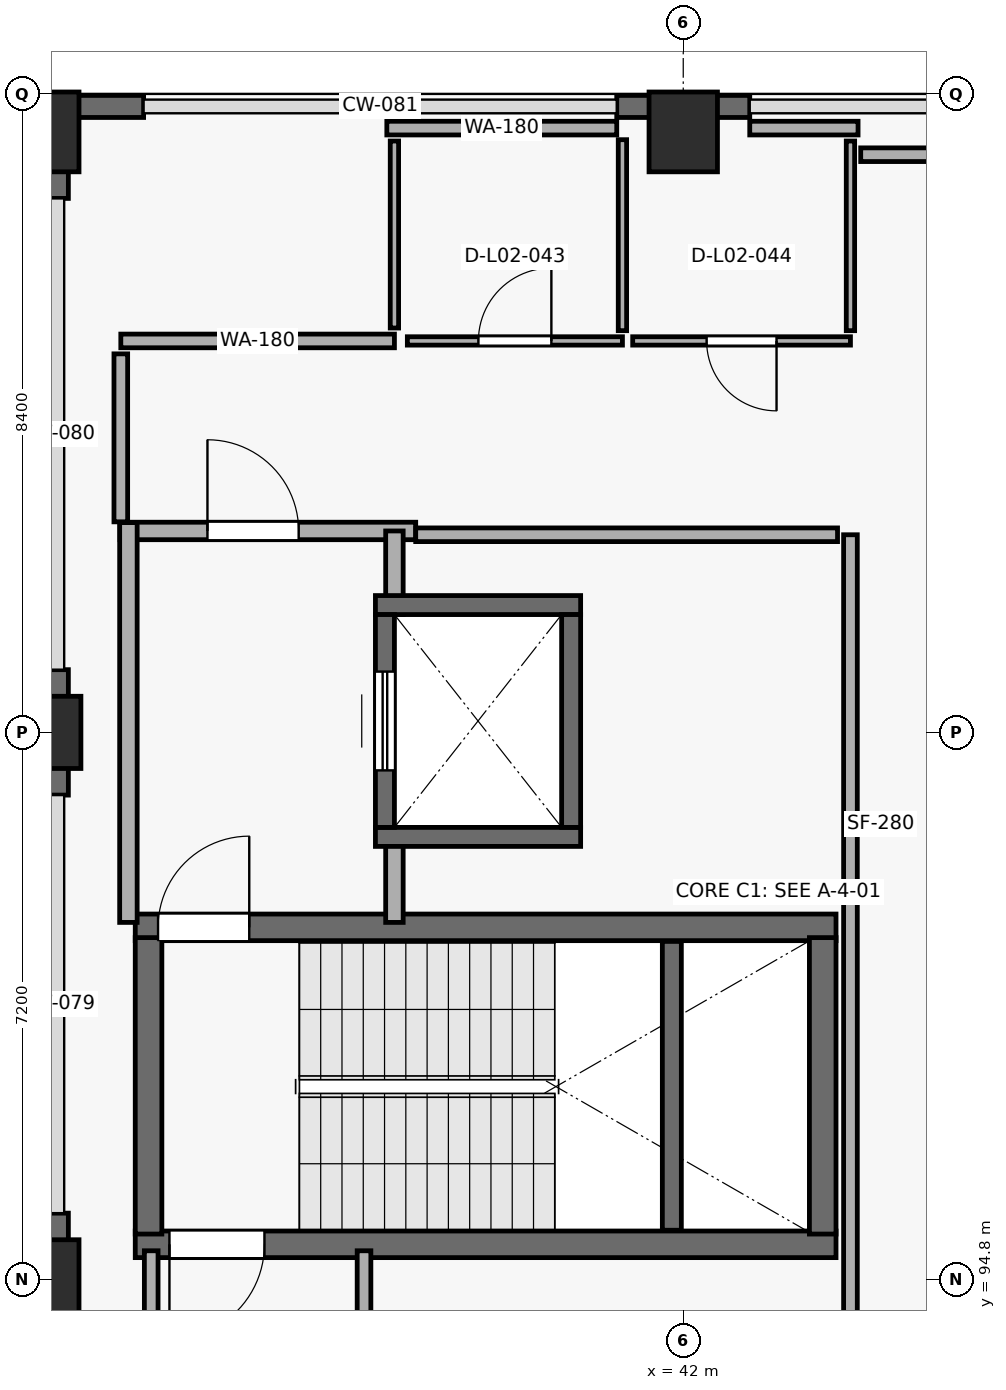
"""IFC4 building model, lengths in metres.
Left out: names, types, materials, properties, quantities, classifications, styles, units other than length and angle.
Written with IfcOpenShell. Run it as: python <this file> out.ifc"""

import sys

from ifc_helpers import new_model, si_unit, direction, frame, frame_2d, origin, origin_2d, place, context, subcontext, project, spatial, rectangle, extrude, element, fill, save


model = new_model("IFC4")
c1 = context("Model", 3, precision=1e-05, world=origin(), true_north=direction((0.0, 1.0)))
c2 = subcontext(c1, "Body", "Model", "MODEL_VIEW")
j1 = project(units=[si_unit("LENGTHUNIT", "METRE"), si_unit("PLANEANGLEUNIT", "RADIAN")], contexts=[c1])
p1 = place(None, origin())
s1 = spatial("IfcSite", under=j1, at=p1, CompositionType="ELEMENT")
p2 = place(p1, origin())
s2 = spatial("IfcBuilding", under=s1, at=p2, CompositionType="ELEMENT")
p3 = place(p2, frame((0.0, 0.0, 5.4)))
s3 = spatial("IfcBuildingStorey", under=s2, at=p3, CompositionType="ELEMENT", Elevation=5.4)
p4 = place(p3, frame((33.6, 94.8, 0.0), z_axis=(0.0, 0.0, 1.0), x_axis=(1.0, 0.0, 0.0)))
e1 = element("IfcColumn", 1, at=p4, inside=s3, PredefinedType="COLUMN", context=c2, shape_type="SweptSolid", body=[
    extrude(rectangle(XDim=0.9, YDim=1.05, at=origin_2d()), origin(), (0.0, 0.0, 1.0), 4.8),
])
p5 = place(p3, frame((33.6, 102.0, 0.0), z_axis=(0.0, 0.0, 1.0), x_axis=(1.0, 0.0, 0.0)))
e2 = element("IfcColumn", 2, at=p5, inside=s3, PredefinedType="COLUMN", context=c2, shape_type="SweptSolid", body=[
    extrude(rectangle(XDim=0.95, YDim=0.95, at=origin_2d()), origin(), (0.0, 0.0, 1.0), 4.8),
])
for number, where, z_axis, x_axis in (
    (3, (33.6, 109.9, 0.0), (0.0, 0.0, 1.0), (1.0, 0.0, 0.0)),
    (4, (42.0, 109.9, 0.0), (0.0, 0.0, 1.0), (1.0, 0.0, 0.0)),
):
    element("IfcColumn", number, at=place(p3, frame(where, z_axis=z_axis, x_axis=x_axis)), inside=s3, PredefinedType="COLUMN", context=c2, shape_type="SweptSolid", body=[
        extrude(rectangle(XDim=0.9, YDim=1.05, at=origin_2d()), origin(), (0.0, 0.0, 1.0), 4.8),
    ])
p6 = place(p3, frame((33.765, 91.2, 0.0), z_axis=(0.0, 0.0, 1.0), x_axis=(0.0, 1.0, 0.0)))
e5 = element("IfcWall", 5, at=p6, inside=s3, PredefinedType="SOLIDWALL", context=c2, shape_type="SweptSolid", body=[
    extrude(rectangle(XDim=4.475, YDim=0.29, at=frame_2d((2.238, 0.0))), origin(), (0.0, 0.0, 1.0), 4.52),
])
p7 = place(p3, frame((33.765, 101.175, 0.0), z_axis=(0.0, 0.0, 1.0), x_axis=(0.0, 1.0, 0.0)))
e6 = element("IfcWall", 6, at=p7, inside=s3, PredefinedType="SOLIDWALL", context=c2, shape_type="SweptSolid", body=[
    extrude(rectangle(XDim=1.65, YDim=0.29, at=frame_2d((0.825, 0.0))), origin(), (0.0, 0.0, 1.0), 4.52),
])
p8 = place(p3, frame((33.765, 109.025, 0.0), z_axis=(0.0, 0.0, 1.0), x_axis=(0.0, 1.0, 0.0)))
e7 = element("IfcWall", 7, at=p8, inside=s3, PredefinedType="SOLIDWALL", context=c2, shape_type="SweptSolid", body=[
    extrude(rectangle(XDim=1.375, YDim=0.29, at=frame_2d((0.688, 0.0))), origin(), (0.0, 0.0, 1.0), 4.52),
])
p9 = place(p3, frame((33.6, 110.235, 0.0), z_axis=(0.0, 0.0, 1.0), x_axis=(1.0, 0.0, 0.0)))
e8 = element("IfcWall", 8, at=p9, inside=s3, PredefinedType="SOLIDWALL", context=c2, shape_type="SweptSolid", body=[
    extrude(rectangle(XDim=1.3, YDim=0.29, at=frame_2d((0.65, 0.0))), origin(), (0.0, 0.0, 1.0), 4.52),
])
p10 = place(p3, frame((41.125, 110.235, 0.0), z_axis=(0.0, 0.0, 1.0), x_axis=(1.0, 0.0, 0.0)))
e9 = element("IfcWall", 9, at=p10, inside=s3, PredefinedType="SOLIDWALL", context=c2, shape_type="SweptSolid", body=[
    extrude(rectangle(XDim=1.75, YDim=0.29, at=frame_2d((0.875, 0.0))), origin(), (0.0, 0.0, 1.0), 4.52),
])
p11 = place(p3, frame((34.79, 95.265, 0.0), z_axis=(0.0, 0.0, 1.0), x_axis=(1.0, 0.0, 0.0)))
e10 = element("IfcWall", 10, at=p11, inside=s3, PredefinedType="SHEAR", context=c2, shape_type="SweptSolid", body=[
    extrude(rectangle(XDim=9.22, YDim=0.35, at=frame_2d((4.61, 0.0))), origin(), (0.0, 0.0, 1.0), 4.52),
])
p12 = place(p11, frame((0.45, 0.0, 0.0)))
e11 = element("IfcOpeningElement", 11, at=p12, cuts=e10, PredefinedType="OPENING", context=c2, shape_type="SweptSolid", body=[
    extrude(rectangle(XDim=1.25, YDim=2.2, at=frame_2d((0.625, 1.1))), frame((0.0, 0.185, 0.0), z_axis=(0.0, -1.0, 0.0), x_axis=(1.0, 0.0, 0.0)), (0.0, 0.0, 1.0), 0.37),
])
p13 = place(p3, frame((44.01, 99.435, 0.0), z_axis=(0.0, 0.0, 1.0), x_axis=(-1.0, 0.0, 0.0)))
e12 = element("IfcWall", 12, at=p13, inside=s3, PredefinedType="SHEAR", context=c2, shape_type="SweptSolid", body=[
    extrude(rectangle(XDim=9.22, YDim=0.35, at=frame_2d((4.61, 0.0))), origin(), (0.0, 0.0, 1.0), 4.52),
])
p14 = place(p13, frame((7.72, 0.0, 0.0)))
e13 = element("IfcOpeningElement", 13, at=p14, cuts=e12, PredefinedType="OPENING", context=c2, shape_type="SweptSolid", body=[
    extrude(rectangle(XDim=1.2, YDim=2.2, at=frame_2d((0.6, 1.1))), frame((0.0, 0.185, 0.0), z_axis=(0.0, -1.0, 0.0), x_axis=(1.0, 0.0, 0.0)), (0.0, 0.0, 1.0), 0.37),
])
for number, where, z_axis, x_axis in (
    (14, (34.965, 95.4, 0.0), (0.0, 0.0, 1.0), (0.0, 1.0, 0.0)),
    (15, (43.835, 99.3, 0.0), (0.0, 0.0, 1.0), (0.0, -1.0, 0.0)),
):
    element("IfcWall", number, at=place(p3, frame(where, z_axis=z_axis, x_axis=x_axis)), inside=s3, PredefinedType="SHEAR", context=c2, shape_type="SweptSolid", body=[
        extrude(rectangle(XDim=3.9, YDim=0.35, at=frame_2d((1.95, 0.0))), origin(), (0.0, 0.0, 1.0), 4.52),
    ])
p15 = place(p3, frame((41.85, 95.45, 0.0), z_axis=(0.0, 0.0, 1.0), x_axis=(0.0, 1.0, 0.0)))
e16 = element("IfcWall", 16, at=p15, inside=s3, PredefinedType="SHEAR", context=c2, shape_type="SweptSolid", body=[
    extrude(rectangle(XDim=3.8, YDim=0.25, at=frame_2d((1.9, 0.0))), origin(), (0.0, 0.0, 1.0), 2.22),
])
p16 = place(p3, frame((34.59, 104.65, 0.0), z_axis=(0.0, 0.0, 1.0), x_axis=(1.0, 0.0, 0.0)))
e17 = element("IfcWall", 17, at=p16, inside=s3, PredefinedType="PARTITIONING", context=c2, shape_type="SweptSolid", body=[
    extrude(rectangle(XDim=3.89, YDim=0.23, at=frame_2d((1.945, 0.0))), origin(), (0.0, 0.0, 1.0), 4.52),
])
p17 = place(p16, frame((1.15, 0.0, 0.0)))
e18 = element("IfcOpeningElement", 18, at=p17, cuts=e17, PredefinedType="OPENING", context=c2, shape_type="SweptSolid", body=[
    extrude(rectangle(XDim=1.2, YDim=2.2, at=frame_2d((0.6, 1.1))), frame((0.0, 0.125, 0.0), z_axis=(0.0, -1.0, 0.0), x_axis=(1.0, 0.0, 0.0)), (0.0, 0.0, 1.0), 0.25),
])
p18 = place(p3, frame((34.7, 99.5, 0.0), z_axis=(0.0, 0.0, 1.0), x_axis=(0.0, 1.0, 0.0)))
e19 = element("IfcWall", 19, at=p18, inside=s3, PredefinedType="PARTITIONING", context=c2, shape_type="SweptSolid", body=[
    extrude(rectangle(XDim=5.26, YDim=0.23, at=frame_2d((2.63, 0.0))), origin(), (0.0, 0.0, 1.0), 4.52),
])
p19 = place(p3, frame((38.2, 104.65, 0.0), z_axis=(0.0, 0.0, 1.0), x_axis=(0.0, -1.0, 0.0)))
e20 = element("IfcWall", 20, at=p19, inside=s3, PredefinedType="PARTITIONING", context=c2, shape_type="SweptSolid", body=[
    extrude(rectangle(XDim=1.1, YDim=0.23, at=frame_2d((0.55, 0.0))), origin(), (0.0, 0.0, 1.0), 4.52),
])
p20 = place(p3, frame((38.2, 100.75, 0.0), z_axis=(0.0, 0.0, 1.0), x_axis=(0.0, -1.0, 0.0)))
e21 = element("IfcWall", 21, at=p20, inside=s3, PredefinedType="PARTITIONING", context=c2, shape_type="SweptSolid", body=[
    extrude(rectangle(XDim=1.25, YDim=0.23, at=frame_2d((0.625, 0.0))), origin(), (0.0, 0.0, 1.0), 4.52),
])
for number, where, z_axis, x_axis in (
    (22, (37.95, 100.625, 0.0), (0.0, 0.0, 1.0), (1.0, 0.0, 0.0)),
    (23, (40.65, 103.675, 0.0), (0.0, 0.0, 1.0), (-1.0, 0.0, 0.0)),
):
    element("IfcWall", number, at=place(p3, frame(where, z_axis=z_axis, x_axis=x_axis)), inside=s3, PredefinedType="SHEAR", context=c2, shape_type="SweptSolid", body=[
        extrude(rectangle(XDim=2.7, YDim=0.25, at=frame_2d((1.35, 0.0))), origin(), (0.0, 0.0, 1.0), 4.52),
    ])
p21 = place(p3, frame((38.075, 100.75, 0.0), z_axis=(0.0, 0.0, 1.0), x_axis=(0.0, 1.0, 0.0)))
e24 = element("IfcWall", 24, at=p21, inside=s3, PredefinedType="SHEAR", context=c2, shape_type="SweptSolid", body=[
    extrude(rectangle(XDim=2.8, YDim=0.25, at=frame_2d((1.4, 0.0))), origin(), (0.0, 0.0, 1.0), 4.52),
])
p22 = place(p21, frame((0.75, 0.0, 0.0)))
e25 = element("IfcOpeningElement", 25, at=p22, cuts=e24, PredefinedType="OPENING", context=c2, shape_type="SweptSolid", body=[
    extrude(rectangle(XDim=1.3, YDim=2.25, at=frame_2d((0.65, 1.125))), frame((0.0, 0.135, 0.0), z_axis=(0.0, -1.0, 0.0), x_axis=(1.0, 0.0, 0.0)), (0.0, 0.0, 1.0), 0.27),
])
p23 = place(p3, frame((40.525, 103.55, 0.0), z_axis=(0.0, 0.0, 1.0), x_axis=(0.0, -1.0, 0.0)))
e26 = element("IfcWall", 26, at=p23, inside=s3, PredefinedType="SHEAR", context=c2, shape_type="SweptSolid", body=[
    extrude(rectangle(XDim=2.8, YDim=0.25, at=frame_2d((1.4, 0.0))), origin(), (0.0, 0.0, 1.0), 4.52),
])
p24 = place(p3, frame((44.2, 104.6, 0.0), z_axis=(0.0, 0.0, 1.0), x_axis=(0.0, -1.0, 0.0)))
e27 = element("IfcWall", 27, at=p24, inside=s3, PredefinedType="PARTITIONING", context=c2, shape_type="SweptSolid", body=[
    extrude(rectangle(XDim=10.75, YDim=0.18, at=frame_2d((5.375, 0.0))), origin(), (0.0, 0.0, 1.0), 4.52),
])
p25 = place(p3, frame((44.3, 109.95, 0.0), z_axis=(0.0, 0.0, 1.0), x_axis=(-1.0, 0.0, 0.0)))
e28 = element("IfcWall", 28, at=p25, inside=s3, PredefinedType="PARTITIONING", context=c2, shape_type="SweptSolid", body=[
    extrude(rectangle(XDim=1.425, YDim=0.18, at=frame_2d((0.712, 0.0))), origin(), (0.0, 0.0, 1.0), 3.6),
])
p26 = place(p3, frame((41.125, 109.95, 0.0), z_axis=(0.0, 0.0, 1.0), x_axis=(-1.0, 0.0, 0.0)))
e29 = element("IfcWall", 29, at=p26, inside=s3, PredefinedType="PARTITIONING", context=c2, shape_type="SweptSolid", body=[
    extrude(rectangle(XDim=3.025, YDim=0.18, at=frame_2d((1.512, 0.0))), origin(), (0.0, 0.0, 1.0), 3.6),
])
p27 = place(p3, frame((38.48, 104.6, 0.0), z_axis=(0.0, 0.0, 1.0), x_axis=(1.0, 0.0, 0.0)))
e30 = element("IfcWall", 30, at=p27, inside=s3, PredefinedType="PARTITIONING", context=c2, shape_type="SweptSolid", body=[
    extrude(rectangle(XDim=5.55, YDim=0.18, at=frame_2d((2.775, 0.0))), origin(), (0.0, 0.0, 1.0), 4.52),
])
p28 = place(p3, frame((38.2, 107.15, 0.0), z_axis=(0.0, 0.0, 1.0), x_axis=(-1.0, 0.0, 0.0)))
e31 = element("IfcWall", 31, at=p28, inside=s3, PredefinedType="PARTITIONING", context=c2, shape_type="SweptSolid", body=[
    extrude(rectangle(XDim=3.6, YDim=0.18, at=frame_2d((1.8, 0.0))), origin(), (0.0, 0.0, 1.0), 4.52),
])
p29 = place(p3, frame((41.2, 107.15, 0.0), z_axis=(0.0, 0.0, 1.0), x_axis=(-1.0, 0.0, 0.0)))
e32 = element("IfcWall", 32, at=p29, inside=s3, PredefinedType="PARTITIONING", context=c2, shape_type="SweptSolid", body=[
    extrude(rectangle(XDim=2.83, YDim=0.11, at=frame_2d((1.415, 0.0))), origin(), (0.0, 0.0, 1.0), 4.52),
])
p30 = place(p29, frame((0.935, 0.0, 0.0)))
e33 = element("IfcOpeningElement", 33, at=p30, cuts=e32, PredefinedType="OPENING", context=c2, shape_type="SweptSolid", body=[
    extrude(rectangle(XDim=0.96, YDim=2.14, at=frame_2d((0.48, 1.07))), frame((0.0, 0.065, 0.0), z_axis=(0.0, -1.0, 0.0), x_axis=(1.0, 0.0, 0.0)), (0.0, 0.0, 1.0), 0.13),
])
p31 = place(p3, frame((44.2, 107.15, 0.0), z_axis=(0.0, 0.0, 1.0), x_axis=(-1.0, 0.0, 0.0)))
e34 = element("IfcWall", 34, at=p31, inside=s3, PredefinedType="PARTITIONING", context=c2, shape_type="SweptSolid", body=[
    extrude(rectangle(XDim=2.865, YDim=0.11, at=frame_2d((1.433, 0.0))), origin(), (0.0, 0.0, 1.0), 4.52),
])
p32 = place(p31, frame((0.972, 0.0, 0.0)))
e35 = element("IfcOpeningElement", 35, at=p32, cuts=e34, PredefinedType="OPENING", context=c2, shape_type="SweptSolid", body=[
    extrude(rectangle(XDim=0.92, YDim=2.12, at=frame_2d((0.46, 1.06))), frame((0.0, 0.065, 0.0), z_axis=(0.0, -1.0, 0.0), x_axis=(1.0, 0.0, 0.0)), (0.0, 0.0, 1.0), 0.13),
])
p33 = place(p3, frame((41.2, 109.798, 0.0), z_axis=(0.0, 0.0, 1.0), x_axis=(0.0, -1.0, 0.0)))
e36 = element("IfcWall", 36, at=p33, inside=s3, PredefinedType="PARTITIONING", context=c2, shape_type="SweptSolid", body=[
    extrude(rectangle(XDim=2.513, YDim=0.11, at=frame_2d((1.256, 0.0))), origin(), (0.0, 0.0, 1.0), 4.52),
])
p34 = place(p3, frame((38.2, 107.32, 0.0), z_axis=(0.0, 0.0, 1.0), x_axis=(0.0, 1.0, 0.0)))
e37 = element("IfcWall", 37, at=p34, inside=s3, PredefinedType="PARTITIONING", context=c2, shape_type="SweptSolid", body=[
    extrude(rectangle(XDim=2.46, YDim=0.11, at=frame_2d((1.23, 0.0))), origin(), (0.0, 0.0, 1.0), 4.52),
])
p35 = place(p3, frame((44.2, 109.78, 0.0), z_axis=(0.0, 0.0, 1.0), x_axis=(0.0, -1.0, 0.0)))
e38 = element("IfcWall", 38, at=p35, inside=s3, PredefinedType="PARTITIONING", context=c2, shape_type="SweptSolid", body=[
    extrude(rectangle(XDim=2.495, YDim=0.11, at=frame_2d((1.248, 0.0))), origin(), (0.0, 0.0, 1.0), 4.52),
])
p36 = place(p3, frame((34.6, 106.98, 0.0), z_axis=(0.0, 0.0, 1.0), x_axis=(0.0, -1.0, 0.0)))
e39 = element("IfcWall", 39, at=p36, inside=s3, PredefinedType="PARTITIONING", context=c2, shape_type="SweptSolid", body=[
    extrude(rectangle(XDim=2.21, YDim=0.18, at=frame_2d((1.105, 0.0))), origin(), (0.0, 0.0, 1.0), 4.52),
])
p37 = place(p3, frame((46.23, 109.6, 0.0), z_axis=(0.0, 0.0, 1.0), x_axis=(-1.0, 0.0, 0.0)))
e40 = element("IfcWall", 40, at=p37, inside=s3, PredefinedType="PARTITIONING", context=c2, shape_type="SweptSolid", body=[
    extrude(rectangle(XDim=1.895, YDim=0.18, at=frame_2d((0.948, 0.0))), origin(), (0.0, 0.0, 1.0), 3.6),
])
p38 = place(p3, frame((37.8, 94.02, 0.0), z_axis=(0.0, 0.0, 1.0), x_axis=(0.0, 1.0, 0.0)))
e41 = element("IfcWall", 41, at=p38, inside=s3, PredefinedType="PARTITIONING", context=c2, shape_type="SweptSolid", body=[
    extrude(rectangle(XDim=1.16, YDim=0.18, at=frame_2d((0.58, 0.0))), origin(), (0.0, 0.0, 1.0), 4.52),
])
p39 = place(p3, frame((35.0, 95.18, 0.0), z_axis=(0.0, 0.0, 1.0), x_axis=(0.0, -1.0, 0.0)))
e42 = element("IfcWall", 42, at=p39, inside=s3, PredefinedType="PARTITIONING", context=c2, shape_type="SweptSolid", body=[
    extrude(rectangle(XDim=1.33, YDim=0.18, at=frame_2d((0.665, 0.0))), origin(), (0.0, 0.0, 1.0), 4.52),
])
p40 = place(p12, origin())
e43 = element("IfcDoor", 43, at=p40, inside=s3, OperationType="SINGLE_SWING_RIGHT", PredefinedType="DOOR", context=c2, shape_type="SweptSolid", body=[
    extrude(rectangle(XDim=1.25, YDim=2.2, at=frame_2d((0.625, 1.1))), frame((0.0, 0.025, 0.0), z_axis=(0.0, -1.0, 0.0), x_axis=(1.0, 0.0, 0.0)), (0.0, 0.0, 1.0), 0.05),
])
fill(e11, e43)
p41 = place(p14, origin())
e44 = element("IfcDoor", 44, at=p41, inside=s3, OperationType="SINGLE_SWING_RIGHT", PredefinedType="DOOR", context=c2, shape_type="SweptSolid", body=[
    extrude(rectangle(XDim=1.2, YDim=2.2, at=frame_2d((0.6, 1.1))), frame((0.0, 0.025, 0.0), z_axis=(0.0, -1.0, 0.0), x_axis=(1.0, 0.0, 0.0)), (0.0, 0.0, 1.0), 0.05),
])
fill(e13, e44)
p42 = place(p17, origin())
e45 = element("IfcDoor", 45, at=p42, inside=s3, OperationType="SINGLE_SWING_LEFT", PredefinedType="DOOR", context=c2, shape_type="SweptSolid", body=[
    extrude(rectangle(XDim=1.2, YDim=2.2, at=frame_2d((0.6, 1.1))), frame((0.0, 0.025, 0.0), z_axis=(0.0, -1.0, 0.0), x_axis=(1.0, 0.0, 0.0)), (0.0, 0.0, 1.0), 0.05),
])
fill(e18, e45)
p43 = place(p22, origin())
e46 = element("IfcDoor", 46, at=p43, inside=s3, OperationType="SLIDING_TO_LEFT", PredefinedType="DOOR", context=c2, shape_type="SweptSolid", body=[
    extrude(rectangle(XDim=1.3, YDim=2.25, at=frame_2d((0.65, 1.125))), frame((0.0, 0.025, 0.0), z_axis=(0.0, -1.0, 0.0), x_axis=(1.0, 0.0, 0.0)), (0.0, 0.0, 1.0), 0.05),
])
fill(e25, e46)
p44 = place(p30, origin())
e47 = element("IfcDoor", 47, at=p44, inside=s3, OperationType="SINGLE_SWING_RIGHT", PredefinedType="DOOR", context=c2, shape_type="SweptSolid", body=[
    extrude(rectangle(XDim=0.96, YDim=2.14, at=frame_2d((0.48, 1.07))), frame((0.0, 0.025, 0.0), z_axis=(0.0, -1.0, 0.0), x_axis=(1.0, 0.0, 0.0)), (0.0, 0.0, 1.0), 0.05),
])
fill(e33, e47)
p45 = place(p32, origin())
e48 = element("IfcDoor", 48, at=p45, inside=s3, OperationType="SINGLE_SWING_LEFT", PredefinedType="DOOR", context=c2, shape_type="SweptSolid", body=[
    extrude(rectangle(XDim=0.92, YDim=2.12, at=frame_2d((0.46, 1.06))), frame((0.0, 0.025, 0.0), z_axis=(0.0, -1.0, 0.0), x_axis=(1.0, 0.0, 0.0)), (0.0, 0.0, 1.0), 0.05),
])
fill(e35, e48)
save(model, sys.argv[1])
